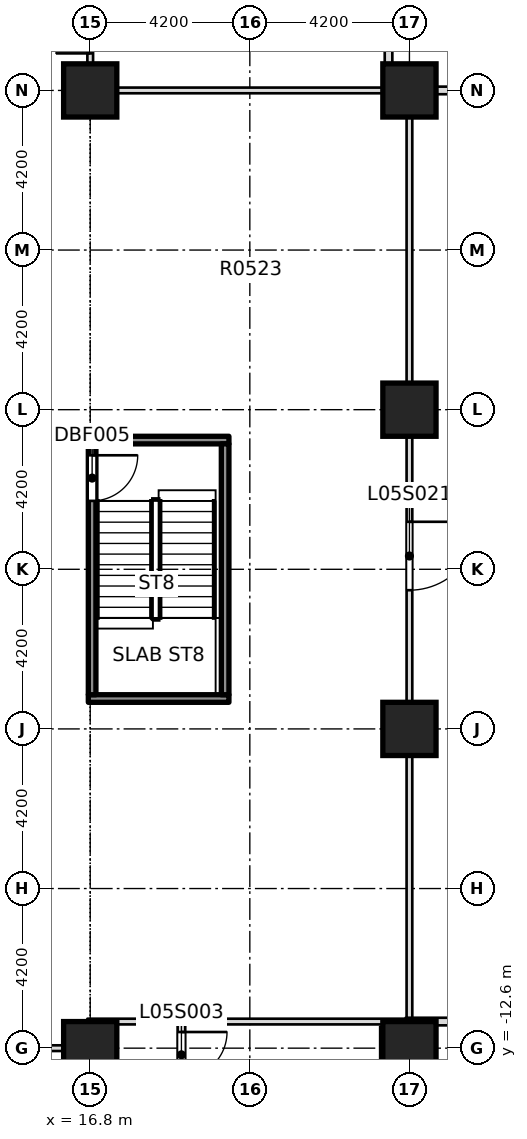
"""IFC4 building model, lengths in metres.
Left out: names, types, materials, properties, quantities, classifications, styles, units other than length and angle.
Written with IfcOpenShell. Run it as: python <this file> out.ifc"""

import sys

from ifc_helpers import new_model, si_unit, direction, frame, frame_2d, origin, origin_2d, place, context, subcontext, project, spatial, rectangle, extrude, element, fill, save


model = new_model("IFC4")
c1 = context("Model", 3, precision=1e-05, world=origin(), true_north=direction((0.0, 1.0)))
c2 = subcontext(c1, "Body", "Model", "MODEL_VIEW")
j1 = project(units=[si_unit("LENGTHUNIT", "METRE"), si_unit("PLANEANGLEUNIT", "RADIAN")], contexts=[c1])
p1 = place(None, origin())
s1 = spatial("IfcSite", under=j1, at=p1, CompositionType="ELEMENT")
p2 = place(p1, origin())
s2 = spatial("IfcBuilding", under=s1, at=p2, CompositionType="ELEMENT")
p3 = place(p2, frame((0.0, 0.0, 30.0)))
s3 = spatial("IfcBuildingStorey", under=s2, at=p3, CompositionType="ELEMENT", Elevation=30.0)
for number, where, z_axis, x_axis in (
    (1, (16.8, -12.6, -0.4), (0.0, 0.0, 1.0), (1.0, 0.0, 0.0)),
    (2, (25.2, -12.6, -0.4), (0.0, 0.0, 1.0), (1.0, 0.0, 0.0)),
    (3, (25.2, -4.2, -0.4), (0.0, 0.0, 1.0), (1.0, 0.0, 0.0)),
    (4, (25.2, 4.2, -0.4), (0.0, 0.0, 1.0), (1.0, 0.0, 0.0)),
    (5, (16.8, 12.6, -0.4), (0.0, 0.0, 1.0), (1.0, 0.0, 0.0)),
    (6, (25.2, 12.6, -0.4), (0.0, 0.0, 1.0), (1.0, 0.0, 0.0)),
):
    element("IfcColumn", number, at=place(p3, frame(where, z_axis=z_axis, x_axis=x_axis)), inside=s3, PredefinedType="COLUMN", context=c2, shape_type="SweptSolid", body=[
        extrude(rectangle(XDim=1.4, YDim=1.4, at=origin_2d()), origin(), (0.0, 0.0, 1.0), 4.58),
    ])
p4 = place(p3, frame((7.275, -12.6, 0.0), z_axis=(0.0, 0.0, 1.0), x_axis=(1.0, 0.0, 0.0)))
e7 = element("IfcWall", 7, at=p4, inside=s3, PredefinedType="PARTITIONING", context=c2, shape_type="SweptSolid", body=[
    extrude(rectangle(XDim=9.625, YDim=0.15, at=frame_2d((4.812, 0.0))), origin(), (0.0, 0.0, 1.0), 4.18),
])
p5 = place(p3, frame((16.725, -11.9, 0.0), z_axis=(0.0, 0.0, 1.0), x_axis=(1.0, 0.0, 0.0)))
e8 = element("IfcWall", 8, at=p5, inside=s3, PredefinedType="PARTITIONING", context=c2, shape_type="SweptSolid", body=[
    extrude(rectangle(XDim=8.575, YDim=0.15, at=frame_2d((4.288, 0.0))), origin(), (0.0, 0.0, 1.0), 4.18),
])
p6 = place(p3, frame((25.1, -11.9, 0.0), z_axis=(0.0, 0.0, 1.0), x_axis=(1.0, 0.0, 0.0)))
e9 = element("IfcWall", 9, at=p6, inside=s3, PredefinedType="PARTITIONING", context=c2, shape_type="SweptSolid", body=[
    extrude(rectangle(XDim=17.45, YDim=0.2, at=frame_2d((8.725, 0.0))), origin(), (0.0, 0.0, 1.0), 4.18),
])
p7 = place(p6, frame((5.125, 0.0, 0.0)))
e10 = element("IfcOpeningElement", 10, at=p7, cuts=e9, PredefinedType="OPENING", context=c2, shape_type="SweptSolid", body=[
    extrude(rectangle(XDim=0.9, YDim=2.1, at=frame_2d((0.45, 1.05))), frame((0.0, 0.11, 0.0), z_axis=(0.0, -1.0, 0.0), x_axis=(1.0, 0.0, 0.0)), (0.0, 0.0, 1.0), 0.22),
])
p8 = place(p3, frame((16.725, 12.6, 0.0), z_axis=(0.0, 0.0, 1.0), x_axis=(1.0, 0.0, 0.0)))
e11 = element("IfcWall", 11, at=p8, inside=s3, PredefinedType="PARTITIONING", context=c2, shape_type="SweptSolid", body=[
    extrude(rectangle(XDim=8.55, YDim=0.15, at=frame_2d((4.275, 0.0))), origin(), (0.0, 0.0, 1.0), 4.18),
])
p9 = place(p3, frame((25.125, 12.6, 0.0), z_axis=(0.0, 0.0, 1.0), x_axis=(1.0, 0.0, 0.0)))
e12 = element("IfcWall", 12, at=p9, inside=s3, PredefinedType="PARTITIONING", context=c2, shape_type="SweptSolid", body=[
    extrude(rectangle(XDim=17.425, YDim=0.2, at=frame_2d((8.712, 0.0))), origin(), (0.0, 0.0, 1.0), 4.18),
])
p10 = place(p9, frame((10.85, 0.0, 0.0)))
e13 = element("IfcOpeningElement", 13, at=p10, cuts=e12, PredefinedType="OPENING", context=c2, shape_type="SweptSolid", body=[
    extrude(rectangle(XDim=0.9, YDim=2.1, at=frame_2d((0.45, 1.05))), frame((0.0, 0.11, 0.0), z_axis=(0.0, -1.0, 0.0), x_axis=(1.0, 0.0, 0.0)), (0.0, 0.0, 1.0), 0.22),
])
p11 = place(p3, frame((16.8, -18.125, 0.0), z_axis=(0.0, 0.0, 1.0), x_axis=(0.0, 1.0, 0.0)))
e14 = element("IfcWall", 14, at=p11, inside=s3, PredefinedType="PARTITIONING", context=c2, shape_type="SweptSolid", body=[
    extrude(rectangle(XDim=5.45, YDim=0.2, at=frame_2d((2.725, 0.0))), origin(), (0.0, 0.0, 1.0), 4.18),
])
p12 = place(p3, frame((16.8, -12.525, 0.0), z_axis=(0.0, 0.0, 1.0), x_axis=(0.0, 1.0, 0.0)))
e15 = element("IfcWall", 15, at=p12, inside=s3, PredefinedType="PARTITIONING", context=c2, shape_type="SweptSolid", body=[
    extrude(rectangle(XDim=0.55, YDim=0.15, at=frame_2d((0.275, 0.0))), origin(), (0.0, 0.0, 1.0), 4.18),
])
p13 = place(p3, frame((16.8, 12.675, 0.0), z_axis=(0.0, 0.0, 1.0), x_axis=(0.0, 1.0, 0.0)))
e16 = element("IfcWall", 16, at=p13, inside=s3, PredefinedType="PARTITIONING", context=c2, shape_type="SweptSolid", body=[
    extrude(rectangle(XDim=2.7, YDim=0.15, at=frame_2d((1.35, 0.0))), origin(), (0.0, 0.0, 1.0), 4.18),
])
p14 = place(p13, frame((0.9, 0.0, 0.0)))
e17 = element("IfcOpeningElement", 17, at=p14, cuts=e16, PredefinedType="OPENING", context=c2, shape_type="SweptSolid", body=[
    extrude(rectangle(XDim=0.9, YDim=2.1, at=frame_2d((0.45, 1.05))), frame((0.0, 0.085, 0.0), z_axis=(0.0, -1.0, 0.0), x_axis=(1.0, 0.0, 0.0)), (0.0, 0.0, 1.0), 0.17),
])
p15 = place(p3, frame((19.2, -18.125, 0.0), z_axis=(0.0, 0.0, 1.0), x_axis=(0.0, 1.0, 0.0)))
e18 = element("IfcWall", 18, at=p15, inside=s3, PredefinedType="PARTITIONING", context=c2, shape_type="SweptSolid", body=[
    extrude(rectangle(XDim=6.15, YDim=0.2, at=frame_2d((3.075, 0.0))), origin(), (0.0, 0.0, 1.0), 4.18),
])
p16 = place(p15, frame((4.75, 0.0, 0.0)))
e19 = element("IfcOpeningElement", 19, at=p16, cuts=e18, PredefinedType="OPENING", context=c2, shape_type="SweptSolid", body=[
    extrude(rectangle(XDim=1.2, YDim=2.1, at=frame_2d((0.6, 1.05))), frame((0.0, 0.11, 0.0), z_axis=(0.0, -1.0, 0.0), x_axis=(1.0, 0.0, 0.0)), (0.0, 0.0, 1.0), 0.22),
])
p17 = place(p3, frame((24.65, 12.675, 0.0), z_axis=(0.0, 0.0, 1.0), x_axis=(0.0, 1.0, 0.0)))
e20 = element("IfcWall", 20, at=p17, inside=s3, PredefinedType="PARTITIONING", context=c2, shape_type="SweptSolid", body=[
    extrude(rectangle(XDim=9.0, YDim=0.2, at=frame_2d((4.5, 0.0))), origin(), (0.0, 0.0, 1.0), 4.18),
])
p18 = place(p3, frame((25.2, -18.125, 0.0), z_axis=(0.0, 0.0, 1.0), x_axis=(0.0, 1.0, 0.0)))
e21 = element("IfcWall", 21, at=p18, inside=s3, PredefinedType="PARTITIONING", context=c2, shape_type="SweptSolid", body=[
    extrude(rectangle(XDim=6.125, YDim=0.2, at=frame_2d((3.062, 0.0))), origin(), (0.0, 0.0, 1.0), 4.18),
])
p19 = place(p3, frame((25.2, -11.8, 0.0), z_axis=(0.0, 0.0, 1.0), x_axis=(0.0, 1.0, 0.0)))
e22 = element("IfcWall", 22, at=p19, inside=s3, PredefinedType="PARTITIONING", context=c2, shape_type="SweptSolid", body=[
    extrude(rectangle(XDim=24.3, YDim=0.15, at=frame_2d((12.15, 0.0))), origin(), (0.0, 0.0, 1.0), 4.18),
])
p20 = place(p19, frame((11.25, 0.0, 0.0)))
e23 = element("IfcOpeningElement", 23, at=p20, cuts=e22, PredefinedType="OPENING", context=c2, shape_type="SweptSolid", body=[
    extrude(rectangle(XDim=1.8, YDim=2.1, at=frame_2d((0.9, 1.05))), frame((0.0, 0.085, 0.0), z_axis=(0.0, -1.0, 0.0), x_axis=(1.0, 0.0, 0.0)), (0.0, 0.0, 1.0), 0.17),
])
for number, where, z_axis, x_axis in (
    (24, (16.75, -3.4, 0.0), (0.0, 0.0, 1.0), (1.0, 0.0, 0.0)),
    (25, (16.75, 3.4, 0.0), (0.0, 0.0, 1.0), (1.0, 0.0, 0.0)),
):
    element("IfcWall", number, at=place(p3, frame(where, z_axis=z_axis, x_axis=x_axis)), inside=s3, PredefinedType="SOLIDWALL", context=c2, shape_type="SweptSolid", body=[
        extrude(rectangle(XDim=3.7, YDim=0.2, at=frame_2d((1.85, 0.0))), origin(), (0.0, 0.0, 1.0), 4.18),
    ])
p21 = place(p3, frame((16.85, -3.3, 0.0), z_axis=(0.0, 0.0, 1.0), x_axis=(0.0, 1.0, 0.0)))
e26 = element("IfcWall", 26, at=p21, inside=s3, PredefinedType="SOLIDWALL", context=c2, shape_type="SweptSolid", body=[
    extrude(rectangle(XDim=6.6, YDim=0.2, at=frame_2d((3.3, 0.0))), origin(), (0.0, 0.0, 1.0), 4.18),
])
p22 = place(p21, frame((5.1, 0.0, 0.0)))
e27 = element("IfcOpeningElement", 27, at=p22, cuts=e26, PredefinedType="OPENING", context=c2, shape_type="SweptSolid", body=[
    extrude(rectangle(XDim=1.2, YDim=2.1, at=frame_2d((0.6, 1.05))), frame((0.0, 0.11, 0.0), z_axis=(0.0, -1.0, 0.0), x_axis=(1.0, 0.0, 0.0)), (0.0, 0.0, 1.0), 0.22),
])
p23 = place(p3, frame((20.35, -3.3, 0.0), z_axis=(0.0, 0.0, 1.0), x_axis=(0.0, 1.0, 0.0)))
e28 = element("IfcWall", 28, at=p23, inside=s3, PredefinedType="SOLIDWALL", context=c2, shape_type="SweptSolid", body=[
    extrude(rectangle(XDim=6.6, YDim=0.2, at=frame_2d((3.3, 0.0))), origin(), (0.0, 0.0, 1.0), 4.18),
])
p24 = place(p16, origin())
e29 = element("IfcDoor", 29, at=p24, inside=s3, OperationType="DOUBLE_DOOR_SINGLE_SWING", PredefinedType="DOOR", context=c2, shape_type="SweptSolid", body=[
    extrude(rectangle(XDim=1.2, YDim=2.1, at=frame_2d((0.6, 1.05))), frame((0.0, 0.025, 0.0), z_axis=(0.0, -1.0, 0.0), x_axis=(1.0, 0.0, 0.0)), (0.0, 0.0, 1.0), 0.05),
])
fill(e19, e29)
p25 = place(p20, origin())
e30 = element("IfcDoor", 30, at=p25, inside=s3, OperationType="DOUBLE_DOOR_SINGLE_SWING", PredefinedType="DOOR", context=c2, shape_type="SweptSolid", body=[
    extrude(rectangle(XDim=1.8, YDim=2.1, at=frame_2d((0.9, 1.05))), frame((0.0, 0.025, 0.0), z_axis=(0.0, -1.0, 0.0), x_axis=(1.0, 0.0, 0.0)), (0.0, 0.0, 1.0), 0.05),
])
fill(e23, e30)
p26 = place(p14, origin())
e31 = element("IfcDoor", 31, at=p26, inside=s3, OperationType="SINGLE_SWING_RIGHT", PredefinedType="DOOR", context=c2, shape_type="SweptSolid", body=[
    extrude(rectangle(XDim=0.9, YDim=2.1, at=frame_2d((0.45, 1.05))), frame((0.0, 0.025, 0.0), z_axis=(0.0, -1.0, 0.0), x_axis=(1.0, 0.0, 0.0)), (0.0, 0.0, 1.0), 0.05),
])
fill(e17, e31)
p27 = place(p22, origin())
e32 = element("IfcDoor", 32, at=p27, inside=s3, OperationType="SINGLE_SWING_LEFT", PredefinedType="DOOR", context=c2, shape_type="SweptSolid", body=[
    extrude(rectangle(XDim=1.2, YDim=2.1, at=frame_2d((0.6, 1.05))), frame((0.0, 0.025, 0.0), z_axis=(0.0, -1.0, 0.0), x_axis=(1.0, 0.0, 0.0)), (0.0, 0.0, 1.0), 0.05),
])
fill(e27, e32)
save(model, sys.argv[1])
